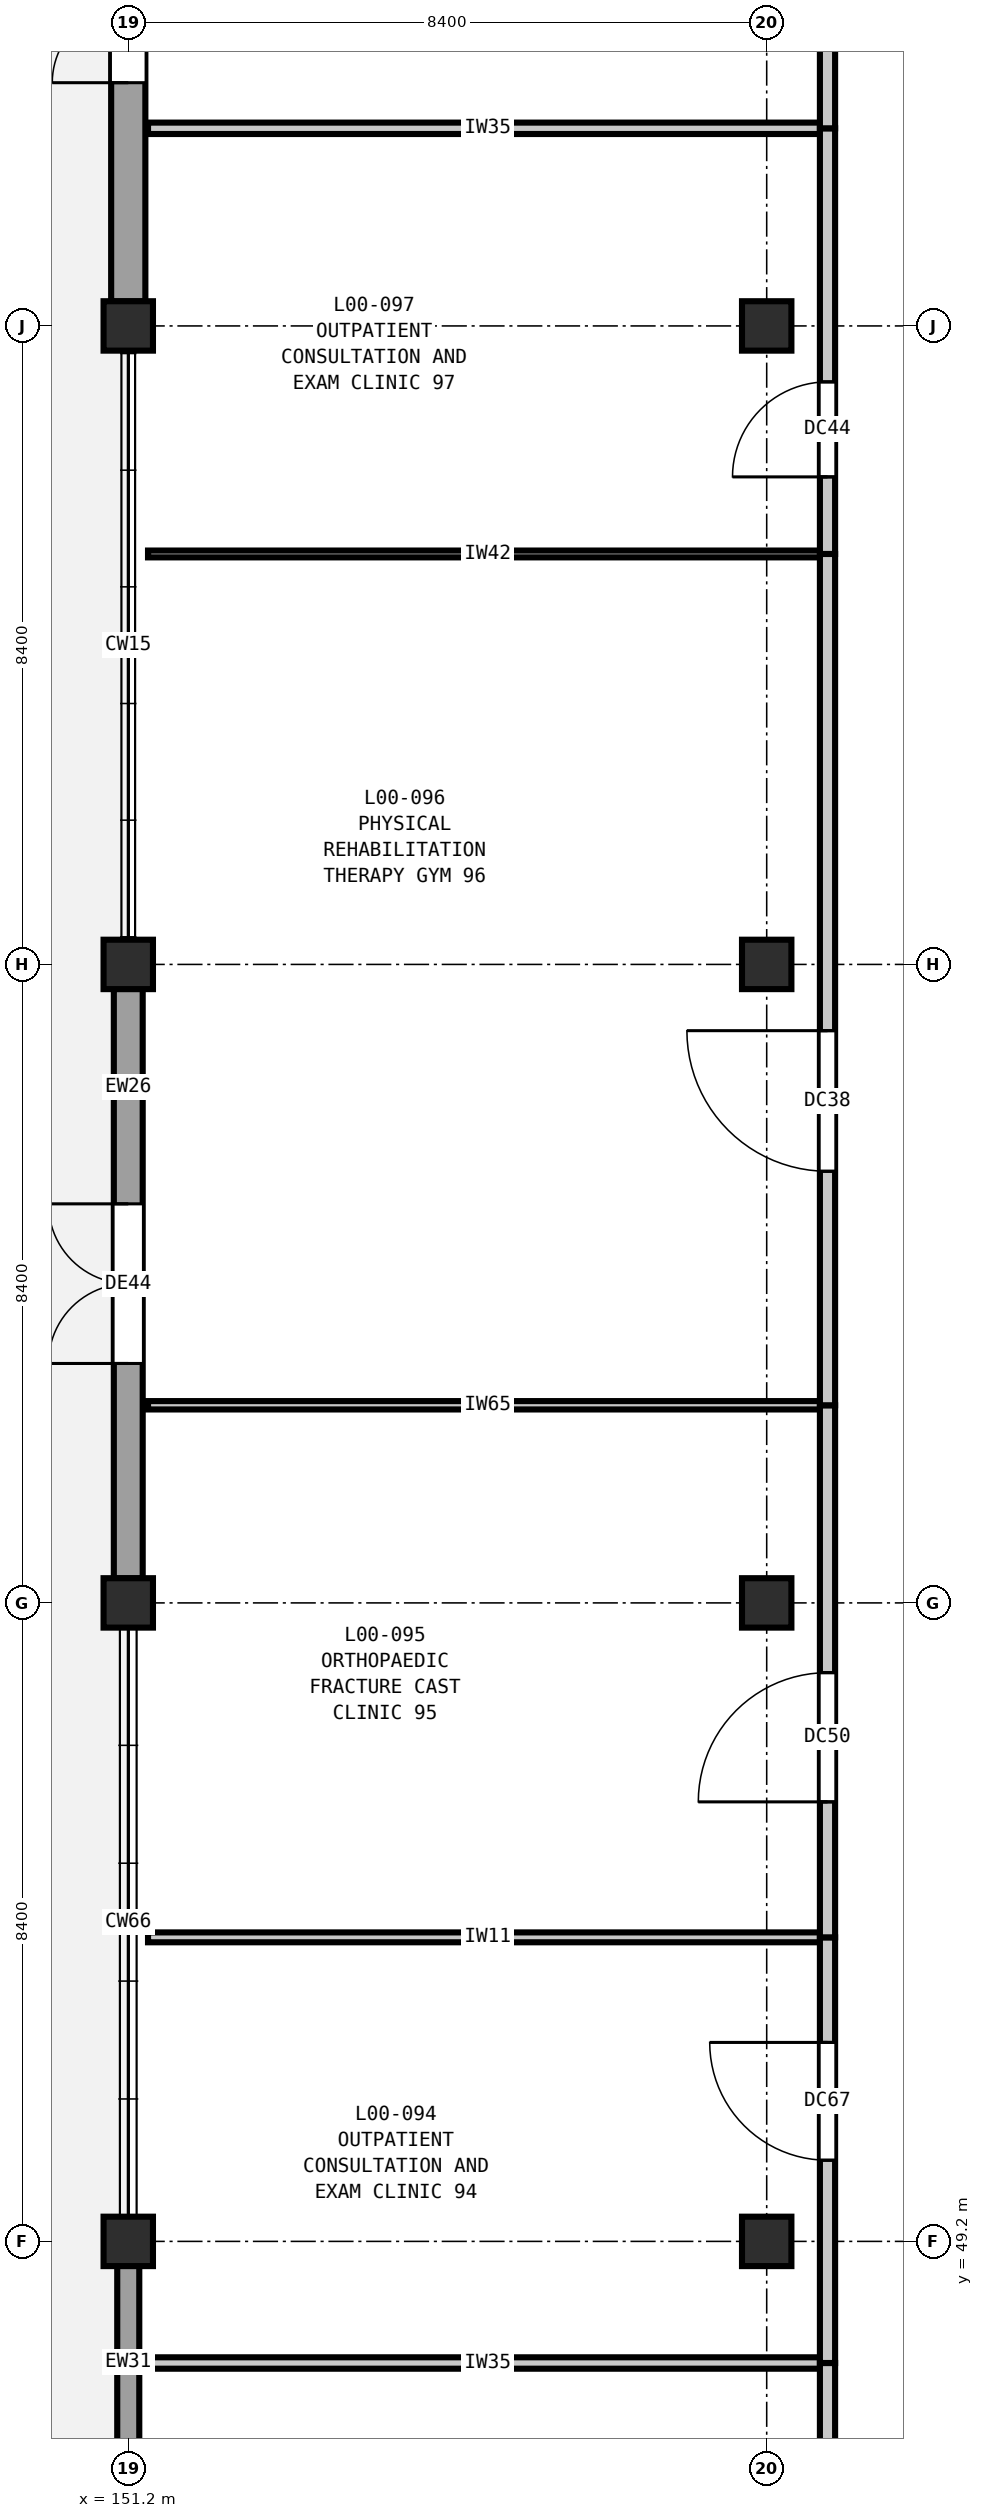
"""IFC4 building model, lengths in metres.
Left out: names, types, materials, properties, quantities, classifications, styles, units other than length and angle.
Written with IfcOpenShell. Run it as: python <this file> out.ifc"""

import sys

from ifc_helpers import new_model, si_unit, direction, frame, frame_2d, origin, origin_2d, place, context, subcontext, project, spatial, rectangle, extrude, element, fill, save


model = new_model("IFC4")
c1 = context("Model", 3, precision=1e-05, world=origin(), true_north=direction((0.0, 1.0)))
c2 = subcontext(c1, "Body", "Model", "MODEL_VIEW")
j1 = project(units=[si_unit("LENGTHUNIT", "METRE"), si_unit("PLANEANGLEUNIT", "RADIAN")], contexts=[c1])
p1 = place(None, origin())
s1 = spatial("IfcSite", under=j1, at=p1, CompositionType="ELEMENT")
p2 = place(p1, origin())
s2 = spatial("IfcBuilding", under=s1, at=p2, CompositionType="ELEMENT")
p3 = place(p2, origin())
s3 = spatial("IfcBuildingStorey", under=s2, at=p3, CompositionType="ELEMENT", Elevation=0.0)
for number, where, z_axis, x_axis in (
    (1, (151.2, 49.2, 0.0), (0.0, 0.0, 1.0), (1.0, 0.0, 0.0)),
    (2, (151.2, 57.6, 0.0), (0.0, 0.0, 1.0), (1.0, 0.0, 0.0)),
    (3, (151.2, 66.0, 0.0), (0.0, 0.0, 1.0), (1.0, 0.0, 0.0)),
    (4, (151.2, 74.4, 0.0), (0.0, 0.0, 1.0), (1.0, 0.0, 0.0)),
    (5, (159.6, 49.2, 0.0), (0.0, 0.0, 1.0), (1.0, 0.0, 0.0)),
    (6, (159.6, 57.6, 0.0), (0.0, 0.0, 1.0), (1.0, 0.0, 0.0)),
    (7, (159.6, 66.0, 0.0), (0.0, 0.0, 1.0), (1.0, 0.0, 0.0)),
    (8, (159.6, 74.4, 0.0), (0.0, 0.0, 1.0), (1.0, 0.0, 0.0)),
):
    element("IfcColumn", number, at=place(p3, frame(where, z_axis=z_axis, x_axis=x_axis)), inside=s3, PredefinedType="COLUMN", context=c2, shape_type="SweptSolid", body=[
        extrude(rectangle(XDim=0.65, YDim=0.65, at=origin_2d()), origin(), (0.0, 0.0, 1.0), 5.4),
    ])
p4 = place(p3, frame((151.2, 41.123, 0.0), z_axis=(0.0, 0.0, 1.0), x_axis=(0.0, 1.0, 0.0)))
e9 = element("IfcWall", 9, at=p4, inside=s3, PredefinedType="SOLIDWALL", context=c2, shape_type="SweptSolid", body=[
    extrude(rectangle(XDim=7.754, YDim=0.29, at=frame_2d((3.877, 0.0))), origin(), (0.0, 0.0, 1.0), 4.68),
])
p5 = place(p4, frame((2.777, 0.0, 0.0)))
e10 = element("IfcOpeningElement", 10, at=p5, cuts=e9, PredefinedType="OPENING", context=c2, shape_type="SweptSolid", body=[
    extrude(rectangle(XDim=2.2, YDim=2.4, at=frame_2d((1.1, 1.2))), frame((0.0, 0.155, 0.0), z_axis=(0.0, -1.0, 0.0), x_axis=(1.0, 0.0, 0.0)), (0.0, 0.0, 1.0), 0.31),
])
p6 = place(p3, frame((151.2, 57.923, 0.0), z_axis=(0.0, 0.0, 1.0), x_axis=(0.0, 1.0, 0.0)))
e11 = element("IfcWall", 11, at=p6, inside=s3, PredefinedType="SOLIDWALL", context=c2, shape_type="SweptSolid", body=[
    extrude(rectangle(XDim=7.754, YDim=0.38, at=frame_2d((3.877, 0.0))), origin(), (0.0, 0.0, 1.0), 4.68),
])
p7 = place(p6, frame((2.827, 0.0, 0.0)))
e12 = element("IfcOpeningElement", 12, at=p7, cuts=e11, PredefinedType="OPENING", context=c2, shape_type="SweptSolid", body=[
    extrude(rectangle(XDim=2.1, YDim=2.35, at=frame_2d((1.05, 1.175))), frame((0.0, 0.2, 0.0), z_axis=(0.0, -1.0, 0.0), x_axis=(1.0, 0.0, 0.0)), (0.0, 0.0, 1.0), 0.4),
])
p8 = place(p3, frame((151.2, 74.723, 0.0), z_axis=(0.0, 0.0, 1.0), x_axis=(0.0, 1.0, 0.0)))
e13 = element("IfcWall", 13, at=p8, inside=s3, PredefinedType="SOLIDWALL", context=c2, shape_type="SweptSolid", body=[
    extrude(rectangle(XDim=7.754, YDim=0.45, at=frame_2d((3.877, 0.0))), origin(), (0.0, 0.0, 1.0), 4.68),
])
p9 = place(p8, frame((2.877, 0.0, 0.0)))
e14 = element("IfcOpeningElement", 14, at=p9, cuts=e13, PredefinedType="OPENING", context=c2, shape_type="SweptSolid", body=[
    extrude(rectangle(XDim=2.0, YDim=2.3, at=frame_2d((1.0, 1.15))), frame((0.0, 0.235, 0.0), z_axis=(0.0, -1.0, 0.0), x_axis=(1.0, 0.0, 0.0)), (0.0, 0.0, 1.0), 0.47),
])
p10 = place(p3, frame((151.46, 47.6, 0.0), z_axis=(0.0, 0.0, 1.0), x_axis=(1.0, 0.0, 0.0)))
e15 = element("IfcWall", 15, at=p10, inside=s3, PredefinedType="PARTITIONING", context=c2, shape_type="SweptSolid", body=[
    extrude(rectangle(XDim=8.94, YDim=0.15, at=frame_2d((4.47, 0.0))), origin(), (0.0, 0.0, 1.0), 5.04),
])
p11 = place(p3, frame((151.46, 53.2, 0.0), z_axis=(0.0, 0.0, 1.0), x_axis=(1.0, 0.0, 0.0)))
e16 = element("IfcWall", 16, at=p11, inside=s3, PredefinedType="PARTITIONING", context=c2, shape_type="SweptSolid", body=[
    extrude(rectangle(XDim=8.94, YDim=0.13, at=frame_2d((4.47, 0.0))), origin(), (0.0, 0.0, 1.0), 5.04),
])
p12 = place(p3, frame((151.46, 60.2, 0.0), z_axis=(0.0, 0.0, 1.0), x_axis=(1.0, 0.0, 0.0)))
e17 = element("IfcWall", 17, at=p12, inside=s3, PredefinedType="PARTITIONING", context=c2, shape_type="SweptSolid", body=[
    extrude(rectangle(XDim=8.94, YDim=0.11, at=frame_2d((4.47, 0.0))), origin(), (0.0, 0.0, 1.0), 5.04),
])
p13 = place(p3, frame((151.46, 71.4, 0.0), z_axis=(0.0, 0.0, 1.0), x_axis=(1.0, 0.0, 0.0)))
e18 = element("IfcWall", 18, at=p13, inside=s3, PredefinedType="PARTITIONING", context=c2, shape_type="SweptSolid", body=[
    extrude(rectangle(XDim=8.94, YDim=0.09, at=frame_2d((4.47, 0.0))), origin(), (0.0, 0.0, 1.0), 5.04),
])
p14 = place(p3, frame((151.46, 77.0, 0.0), z_axis=(0.0, 0.0, 1.0), x_axis=(1.0, 0.0, 0.0)))
e19 = element("IfcWall", 19, at=p14, inside=s3, PredefinedType="PARTITIONING", context=c2, shape_type="SweptSolid", body=[
    extrude(rectangle(XDim=8.94, YDim=0.15, at=frame_2d((4.47, 0.0))), origin(), (0.0, 0.0, 1.0), 5.04),
])
p15 = place(p3, frame((160.4, 36.4, 0.0), z_axis=(0.0, 0.0, 1.0), x_axis=(0.0, 1.0, 0.0)))
e20 = element("IfcWall", 20, at=p15, inside=s3, PredefinedType="PARTITIONING", context=c2, shape_type="SweptSolid", body=[
    extrude(rectangle(XDim=11.2, YDim=0.2, at=frame_2d((5.6, 0.0))), origin(), (0.0, 0.0, 1.0), 5.04),
])
p16 = place(p15, frame((6.544, 0.0, 0.0)))
e21 = element("IfcOpeningElement", 21, at=p16, cuts=e20, PredefinedType="OPENING", context=c2, shape_type="SweptSolid", body=[
    extrude(rectangle(XDim=1.45, YDim=2.25, at=frame_2d((0.725, 1.125))), frame((0.0, 0.11, 0.0), z_axis=(0.0, -1.0, 0.0), x_axis=(1.0, 0.0, 0.0)), (0.0, 0.0, 1.0), 0.22),
])
p17 = place(p3, frame((160.4, 47.6, 0.0), z_axis=(0.0, 0.0, 1.0), x_axis=(0.0, 1.0, 0.0)))
e22 = element("IfcWall", 22, at=p17, inside=s3, PredefinedType="PARTITIONING", context=c2, shape_type="SweptSolid", body=[
    extrude(rectangle(XDim=5.6, YDim=0.2, at=frame_2d((2.8, 0.0))), origin(), (0.0, 0.0, 1.0), 5.04),
])
p18 = place(p17, frame((2.667, 0.0, 0.0)))
e23 = element("IfcOpeningElement", 23, at=p18, cuts=e22, PredefinedType="OPENING", context=c2, shape_type="SweptSolid", body=[
    extrude(rectangle(XDim=1.55, YDim=2.25, at=frame_2d((0.775, 1.125))), frame((0.0, 0.11, 0.0), z_axis=(0.0, -1.0, 0.0), x_axis=(1.0, 0.0, 0.0)), (0.0, 0.0, 1.0), 0.22),
])
p19 = place(p3, frame((160.4, 53.2, 0.0), z_axis=(0.0, 0.0, 1.0), x_axis=(0.0, 1.0, 0.0)))
e24 = element("IfcWall", 24, at=p19, inside=s3, PredefinedType="PARTITIONING", context=c2, shape_type="SweptSolid", body=[
    extrude(rectangle(XDim=7.0, YDim=0.2, at=frame_2d((3.5, 0.0))), origin(), (0.0, 0.0, 1.0), 5.04),
])
p20 = place(p19, frame((1.782, 0.0, 0.0)))
e25 = element("IfcOpeningElement", 25, at=p20, cuts=e24, PredefinedType="OPENING", context=c2, shape_type="SweptSolid", body=[
    extrude(rectangle(XDim=1.7, YDim=2.3, at=frame_2d((0.85, 1.15))), frame((0.0, 0.11, 0.0), z_axis=(0.0, -1.0, 0.0), x_axis=(1.0, 0.0, 0.0)), (0.0, 0.0, 1.0), 0.22),
])
p21 = place(p3, frame((160.4, 60.2, 0.0), z_axis=(0.0, 0.0, 1.0), x_axis=(0.0, 1.0, 0.0)))
e26 = element("IfcWall", 26, at=p21, inside=s3, PredefinedType="PARTITIONING", context=c2, shape_type="SweptSolid", body=[
    extrude(rectangle(XDim=11.2, YDim=0.2, at=frame_2d((5.6, 0.0))), origin(), (0.0, 0.0, 1.0), 5.04),
])
p22 = place(p21, frame((3.078, 0.0, 0.0)))
e27 = element("IfcOpeningElement", 27, at=p22, cuts=e26, PredefinedType="OPENING", context=c2, shape_type="SweptSolid", body=[
    extrude(rectangle(XDim=1.85, YDim=2.3, at=frame_2d((0.925, 1.15))), frame((0.0, 0.11, 0.0), z_axis=(0.0, -1.0, 0.0), x_axis=(1.0, 0.0, 0.0)), (0.0, 0.0, 1.0), 0.22),
])
p23 = place(p3, frame((160.4, 71.4, 0.0), z_axis=(0.0, 0.0, 1.0), x_axis=(0.0, 1.0, 0.0)))
e28 = element("IfcWall", 28, at=p23, inside=s3, PredefinedType="PARTITIONING", context=c2, shape_type="SweptSolid", body=[
    extrude(rectangle(XDim=5.6, YDim=0.2, at=frame_2d((2.8, 0.0))), origin(), (0.0, 0.0, 1.0), 5.04),
])
p24 = place(p23, frame((1.014, 0.0, 0.0)))
e29 = element("IfcOpeningElement", 29, at=p24, cuts=e28, PredefinedType="OPENING", context=c2, shape_type="SweptSolid", body=[
    extrude(rectangle(XDim=1.25, YDim=2.15, at=frame_2d((0.625, 1.075))), frame((0.0, 0.11, 0.0), z_axis=(0.0, -1.0, 0.0), x_axis=(1.0, 0.0, 0.0)), (0.0, 0.0, 1.0), 0.22),
])
p25 = place(p3, frame((160.4, 77.0, 0.0), z_axis=(0.0, 0.0, 1.0), x_axis=(0.0, 1.0, 0.0)))
e30 = element("IfcWall", 30, at=p25, inside=s3, PredefinedType="PARTITIONING", context=c2, shape_type="SweptSolid", body=[
    extrude(rectangle(XDim=5.8, YDim=0.2, at=frame_2d((2.9, 0.0))), origin(), (0.0, 0.0, 1.0), 5.04),
])
p26 = place(p25, frame((2.25, 0.0, 0.0)))
e31 = element("IfcOpeningElement", 31, at=p26, cuts=e30, PredefinedType="OPENING", context=c2, shape_type="SweptSolid", body=[
    extrude(rectangle(XDim=1.3, YDim=2.2, at=frame_2d((0.65, 1.1))), frame((0.0, 0.11, 0.0), z_axis=(0.0, -1.0, 0.0), x_axis=(1.0, 0.0, 0.0)), (0.0, 0.0, 1.0), 0.22),
])
p27 = place(p7, origin())
e32 = element("IfcDoor", 32, at=p27, inside=s3, OperationType="DOUBLE_DOOR_SINGLE_SWING", PredefinedType="DOOR", context=c2, shape_type="SweptSolid", body=[
    extrude(rectangle(XDim=2.1, YDim=2.35, at=frame_2d((1.05, 1.175))), frame((0.0, 0.025, 0.0), z_axis=(0.0, -1.0, 0.0), x_axis=(1.0, 0.0, 0.0)), (0.0, 0.0, 1.0), 0.05),
])
fill(e12, e32)
p28 = place(p9, origin())
e33 = element("IfcDoor", 33, at=p28, inside=s3, OperationType="DOUBLE_DOOR_SINGLE_SWING", PredefinedType="DOOR", context=c2, shape_type="SweptSolid", body=[
    extrude(rectangle(XDim=2.0, YDim=2.3, at=frame_2d((1.0, 1.15))), frame((0.0, 0.025, 0.0), z_axis=(0.0, -1.0, 0.0), x_axis=(1.0, 0.0, 0.0)), (0.0, 0.0, 1.0), 0.05),
])
fill(e14, e33)
p29 = place(p18, origin())
e34 = element("IfcDoor", 34, at=p29, inside=s3, OperationType="SINGLE_SWING_RIGHT", PredefinedType="DOOR", context=c2, shape_type="SweptSolid", body=[
    extrude(rectangle(XDim=1.55, YDim=2.25, at=frame_2d((0.775, 1.125))), frame((0.0, 0.025, 0.0), z_axis=(0.0, -1.0, 0.0), x_axis=(1.0, 0.0, 0.0)), (0.0, 0.0, 1.0), 0.05),
])
fill(e23, e34)
p30 = place(p20, origin())
e35 = element("IfcDoor", 35, at=p30, inside=s3, OperationType="SINGLE_SWING_LEFT", PredefinedType="DOOR", context=c2, shape_type="SweptSolid", body=[
    extrude(rectangle(XDim=1.7, YDim=2.3, at=frame_2d((0.85, 1.15))), frame((0.0, 0.025, 0.0), z_axis=(0.0, -1.0, 0.0), x_axis=(1.0, 0.0, 0.0)), (0.0, 0.0, 1.0), 0.05),
])
fill(e25, e35)
p31 = place(p22, origin())
e36 = element("IfcDoor", 36, at=p31, inside=s3, OperationType="SINGLE_SWING_RIGHT", PredefinedType="DOOR", context=c2, shape_type="SweptSolid", body=[
    extrude(rectangle(XDim=1.85, YDim=2.3, at=frame_2d((0.925, 1.15))), frame((0.0, 0.025, 0.0), z_axis=(0.0, -1.0, 0.0), x_axis=(1.0, 0.0, 0.0)), (0.0, 0.0, 1.0), 0.05),
])
fill(e27, e36)
p32 = place(p24, origin())
e37 = element("IfcDoor", 37, at=p32, inside=s3, OperationType="SINGLE_SWING_LEFT", PredefinedType="DOOR", context=c2, shape_type="SweptSolid", body=[
    extrude(rectangle(XDim=1.25, YDim=2.15, at=frame_2d((0.625, 1.075))), frame((0.0, 0.025, 0.0), z_axis=(0.0, -1.0, 0.0), x_axis=(1.0, 0.0, 0.0)), (0.0, 0.0, 1.0), 0.05),
])
fill(e29, e37)
save(model, sys.argv[1])
